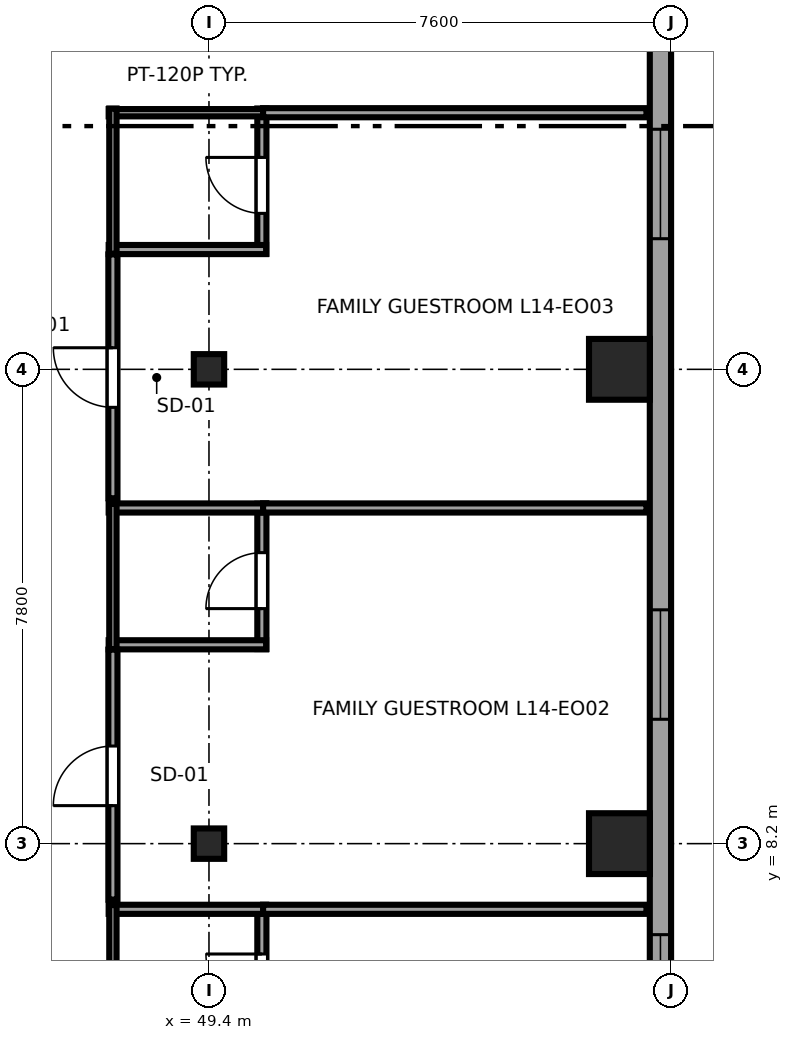
"""IFC4 building model, lengths in metres.
Left out: names, types, materials, properties, quantities, classifications, styles, units other than length and angle.
Written with IfcOpenShell. Run it as: python <this file> out.ifc"""

import sys

from ifc_helpers import new_model, si_unit, direction, frame, frame_2d, origin, origin_2d, place, context, subcontext, project, spatial, rectangle, i_section, extrude, source, transform, mapped, element, fill, save


model = new_model("IFC4")
c1 = context("Model", 3, precision=1e-05, world=origin(), true_north=direction((0.0, 1.0)))
c2 = subcontext(c1, "Body", "Model", "MODEL_VIEW")
j1 = project(units=[si_unit("LENGTHUNIT", "METRE"), si_unit("PLANEANGLEUNIT", "RADIAN")], contexts=[c1])
p1 = place(None, origin())
s1 = spatial("IfcSite", under=j1, at=p1, CompositionType="ELEMENT")
p2 = place(p1, origin())
s2 = spatial("IfcBuilding", under=s1, at=p2, CompositionType="ELEMENT")
p3 = place(p2, frame((0.0, 0.0, 60.4)))
s3 = spatial("IfcBuildingStorey", under=s2, at=p3, CompositionType="ELEMENT", Elevation=60.4)
m1 = source(origin(), c2, "Body", "SweptSolid", [
    extrude(i_section(OverallWidth=0.5, OverallDepth=0.5, WebThickness=0.028, FlangeThickness=0.045, at=origin_2d()), origin(), (0.0, 0.0, 1.0), 3.55),
])
for number, where, z_axis, x_axis in (
    (1, (49.4, 8.2, 0.0), (0.0, 0.0, 1.0), (1.0, 0.0, 0.0)),
    (2, (49.4, 16.0, 0.0), (0.0, 0.0, 1.0), (1.0, 0.0, 0.0)),
):
    element("IfcColumn", number, at=place(p3, frame(where, z_axis=z_axis, x_axis=x_axis)), inside=s3, PredefinedType="COLUMN", context=c2, shape_type="MappedRepresentation", body=[
        mapped(m1, transform((0.0, 0.0, 0.0), x_axis=(1.0, 0.0, 0.0), y_axis=(0.0, 1.0, 0.0), z_axis=(0.0, 0.0, 1.0), scale=1.0)),
    ])
m2 = source(origin(), c2, "Body", "SweptSolid", [
    extrude(rectangle(XDim=1.0, YDim=1.0, at=origin_2d()), origin(), (0.0, 0.0, 1.0), 3.55),
])
for number, where, z_axis, x_axis in (
    (3, (56.15, 8.2, 0.0), (0.0, 0.0, 1.0), (1.0, 0.0, 0.0)),
    (4, (56.15, 16.0, 0.0), (0.0, 0.0, 1.0), (1.0, 0.0, 0.0)),
):
    element("IfcColumn", number, at=place(p3, frame(where, z_axis=z_axis, x_axis=x_axis)), inside=s3, PredefinedType="COLUMN", context=c2, shape_type="MappedRepresentation", body=[
        mapped(m2, transform((0.0, 0.0, 0.0), x_axis=(1.0, 0.0, 0.0), y_axis=(0.0, 1.0, 0.0), z_axis=(0.0, 0.0, 1.0), scale=1.0)),
    ])
p4 = place(p3, frame((56.825, 4.617, 0.0), z_axis=(0.0, 0.0, 1.0), x_axis=(0.0, 1.0, 0.0)))
e5 = element("IfcWall", 5, at=p4, inside=s3, PredefinedType="SOLIDWALL", context=c2, shape_type="SweptSolid", body=[
    extrude(rectangle(XDim=36.766, YDim=0.35, at=frame_2d((18.383, 0.0))), origin(), (0.0, 0.0, 1.0), 3.37),
])
p5 = place(p4, frame((5.628, 0.0, 0.68)))
e6 = element("IfcOpeningElement", 6, at=p5, cuts=e5, PredefinedType="OPENING", context=c2, shape_type="SweptSolid", body=[
    extrude(rectangle(XDim=1.8, YDim=1.85, at=frame_2d((0.9, 0.925))), frame((0.0, 0.185, 0.0), z_axis=(0.0, -1.0, 0.0), x_axis=(1.0, 0.0, 0.0)), (0.0, 0.0, 1.0), 0.37),
])
p6 = place(p4, frame((13.531, 0.0, 0.68)))
e7 = element("IfcOpeningElement", 7, at=p6, cuts=e5, PredefinedType="OPENING", context=c2, shape_type="SweptSolid", body=[
    extrude(rectangle(XDim=1.8, YDim=1.85, at=frame_2d((0.9, 0.925))), frame((0.0, 0.185, 0.0), z_axis=(0.0, -1.0, 0.0), x_axis=(1.0, 0.0, 0.0)), (0.0, 0.0, 1.0), 0.37),
])
p7 = place(p4, frame((16.933, 0.0, 0.68)))
e8 = element("IfcOpeningElement", 8, at=p7, cuts=e5, PredefinedType="OPENING", context=c2, shape_type="SweptSolid", body=[
    extrude(rectangle(XDim=1.8, YDim=1.85, at=frame_2d((0.9, 0.925))), frame((0.0, 0.185, 0.0), z_axis=(0.0, -1.0, 0.0), x_axis=(1.0, 0.0, 0.0)), (0.0, 0.0, 1.0), 0.37),
])
p8 = place(p4, frame((25.386, 0.0, 0.68)))
e9 = element("IfcOpeningElement", 9, at=p8, cuts=e5, PredefinedType="OPENING", context=c2, shape_type="SweptSolid", body=[
    extrude(rectangle(XDim=1.8, YDim=1.85, at=frame_2d((0.9, 0.925))), frame((0.0, 0.185, 0.0), z_axis=(0.0, -1.0, 0.0), x_axis=(1.0, 0.0, 0.0)), (0.0, 0.0, 1.0), 0.37),
])
p9 = place(p4, frame((30.388, 0.0, 0.68)))
e10 = element("IfcOpeningElement", 10, at=p9, cuts=e5, PredefinedType="OPENING", context=c2, shape_type="SweptSolid", body=[
    extrude(rectangle(XDim=1.8, YDim=1.85, at=frame_2d((0.9, 0.925))), frame((0.0, 0.185, 0.0), z_axis=(0.0, -1.0, 0.0), x_axis=(1.0, 0.0, 0.0)), (0.0, 0.0, 1.0), 0.37),
])
p10 = place(p4, frame((33.29, 0.0, 0.68)))
e11 = element("IfcOpeningElement", 11, at=p10, cuts=e5, PredefinedType="OPENING", context=c2, shape_type="SweptSolid", body=[
    extrude(rectangle(XDim=1.8, YDim=1.85, at=frame_2d((0.9, 0.925))), frame((0.0, 0.185, 0.0), z_axis=(0.0, -1.0, 0.0), x_axis=(1.0, 0.0, 0.0)), (0.0, 0.0, 1.0), 0.37),
])
p11 = place(p4, frame((0.586, 0.0, 0.62)))
e12 = element("IfcOpeningElement", 12, at=p11, cuts=e5, PredefinedType="OPENING", context=c2, shape_type="SweptSolid", body=[
    extrude(rectangle(XDim=1.5, YDim=1.55, at=frame_2d((0.75, 0.775))), frame((0.0, 0.185, 0.0), z_axis=(0.0, -1.0, 0.0), x_axis=(1.0, 0.0, 0.0)), (0.0, 0.0, 1.0), 0.37),
])
p12 = place(p3, frame((50.27, 4.8, 0.0), z_axis=(0.0, 0.0, 1.0), x_axis=(0.0, 1.0, 0.0)))
e13 = element("IfcWall", 13, at=p12, inside=s3, PredefinedType="PARTITIONING", context=c2, shape_type="SweptSolid", body=[
    extrude(rectangle(XDim=2.39, YDim=0.15, at=frame_2d((1.195, 0.0))), origin(), (0.0, 0.0, 1.0), 3.37),
])
p13 = place(p12, frame((0.665, 0.0, 0.0)))
e14 = element("IfcOpeningElement", 14, at=p13, cuts=e13, PredefinedType="OPENING", context=c2, shape_type="SweptSolid", body=[
    extrude(rectangle(XDim=0.92, YDim=2.01, at=frame_2d((0.46, 1.005))), frame((0.0, 0.085, 0.0), z_axis=(0.0, -1.0, 0.0), x_axis=(1.0, 0.0, 0.0)), (0.0, 0.0, 1.0), 0.17),
])
p14 = place(p3, frame((47.75, 7.12, 0.0), z_axis=(0.0, 0.0, 1.0), x_axis=(1.0, 0.0, 0.0)))
e15 = element("IfcWall", 15, at=p14, inside=s3, PredefinedType="PARTITIONING", context=c2, shape_type="SweptSolid", body=[
    extrude(rectangle(XDim=2.59, YDim=0.15, at=frame_2d((1.295, 0.0))), origin(), (0.0, 0.0, 1.0), 3.37),
])
p15 = place(p3, frame((47.82, 4.8, 0.0), z_axis=(0.0, 0.0, 1.0), x_axis=(0.0, 1.0, 0.0)))
e16 = element("IfcWall", 16, at=p15, inside=s3, PredefinedType="PLUMBINGWALL", context=c2, shape_type="SweptSolid", body=[
    extrude(rectangle(XDim=2.39, YDim=0.12, at=frame_2d((1.195, 0.0))), origin(), (0.0, 0.0, 1.0), 3.37),
])
p16 = place(p3, frame((50.27, 11.4, 0.0), z_axis=(0.0, 0.0, 1.0), x_axis=(0.0, 1.0, 0.0)))
e17 = element("IfcWall", 17, at=p16, inside=s3, PredefinedType="PARTITIONING", context=c2, shape_type="SweptSolid", body=[
    extrude(rectangle(XDim=2.39, YDim=0.15, at=frame_2d((1.195, 0.0))), origin(), (0.0, 0.0, 1.0), 3.37),
])
p17 = place(p16, frame((0.665, 0.0, 0.0)))
e18 = element("IfcOpeningElement", 18, at=p17, cuts=e17, PredefinedType="OPENING", context=c2, shape_type="SweptSolid", body=[
    extrude(rectangle(XDim=0.92, YDim=2.01, at=frame_2d((0.46, 1.005))), frame((0.0, 0.085, 0.0), z_axis=(0.0, -1.0, 0.0), x_axis=(1.0, 0.0, 0.0)), (0.0, 0.0, 1.0), 0.17),
])
for number, where, z_axis, x_axis in (
    (19, (47.75, 11.47, 0.0), (0.0, 0.0, 1.0), (1.0, 0.0, 0.0)),
    (20, (47.75, 13.72, 0.0), (0.0, 0.0, 1.0), (1.0, 0.0, 0.0)),
):
    element("IfcWall", number, at=place(p3, frame(where, z_axis=z_axis, x_axis=x_axis)), inside=s3, PredefinedType="PARTITIONING", context=c2, shape_type="SweptSolid", body=[
        extrude(rectangle(XDim=2.59, YDim=0.15, at=frame_2d((1.295, 0.0))), origin(), (0.0, 0.0, 1.0), 3.37),
    ])
p18 = place(p3, frame((47.82, 11.4, 0.0), z_axis=(0.0, 0.0, 1.0), x_axis=(0.0, 1.0, 0.0)))
e21 = element("IfcWall", 21, at=p18, inside=s3, PredefinedType="PLUMBINGWALL", context=c2, shape_type="SweptSolid", body=[
    extrude(rectangle(XDim=2.39, YDim=0.12, at=frame_2d((1.195, 0.0))), origin(), (0.0, 0.0, 1.0), 3.37),
])
p19 = place(p3, frame((50.27, 17.9, 0.0), z_axis=(0.0, 0.0, 1.0), x_axis=(0.0, 1.0, 0.0)))
e22 = element("IfcWall", 22, at=p19, inside=s3, PredefinedType="PARTITIONING", context=c2, shape_type="SweptSolid", body=[
    extrude(rectangle(XDim=2.39, YDim=0.15, at=frame_2d((1.195, 0.0))), origin(), (0.0, 0.0, 1.0), 3.37),
])
p20 = place(p19, frame((0.665, 0.0, 0.0)))
e23 = element("IfcOpeningElement", 23, at=p20, cuts=e22, PredefinedType="OPENING", context=c2, shape_type="SweptSolid", body=[
    extrude(rectangle(XDim=0.92, YDim=2.01, at=frame_2d((0.46, 1.005))), frame((0.0, 0.085, 0.0), z_axis=(0.0, -1.0, 0.0), x_axis=(1.0, 0.0, 0.0)), (0.0, 0.0, 1.0), 0.17),
])
p21 = place(p3, frame((47.75, 17.97, 0.0), z_axis=(0.0, 0.0, 1.0), x_axis=(1.0, 0.0, 0.0)))
e24 = element("IfcWall", 24, at=p21, inside=s3, PredefinedType="PARTITIONING", context=c2, shape_type="SweptSolid", body=[
    extrude(rectangle(XDim=2.59, YDim=0.15, at=frame_2d((1.295, 0.0))), origin(), (0.0, 0.0, 1.0), 3.37),
])
p22 = place(p3, frame((47.75, 20.22, 0.0), z_axis=(0.0, 0.0, 1.0), x_axis=(1.0, 0.0, 0.0)))
e25 = element("IfcWall", 25, at=p22, inside=s3, PredefinedType="PLUMBINGWALL", context=c2, shape_type="SweptSolid", body=[
    extrude(rectangle(XDim=2.59, YDim=0.12, at=frame_2d((1.295, 0.0))), origin(), (0.0, 0.0, 1.0), 3.37),
])
p23 = place(p3, frame((47.82, 17.9, 0.0), z_axis=(0.0, 0.0, 1.0), x_axis=(0.0, 1.0, 0.0)))
e26 = element("IfcWall", 26, at=p23, inside=s3, PredefinedType="PLUMBINGWALL", context=c2, shape_type="SweptSolid", body=[
    extrude(rectangle(XDim=2.39, YDim=0.12, at=frame_2d((1.195, 0.0))), origin(), (0.0, 0.0, 1.0), 3.37),
])
p24 = place(p3, frame((50.29, 7.12, 0.0), z_axis=(0.0, 0.0, 1.0), x_axis=(1.0, 0.0, 0.0)))
e27 = element("IfcWall", 27, at=p24, inside=s3, PredefinedType="PARTITIONING", context=c2, shape_type="SweptSolid", body=[
    extrude(rectangle(XDim=6.305, YDim=0.15, at=frame_2d((3.152, 0.0))), origin(), (0.0, 0.0, 1.0), 3.37),
])
p25 = place(p3, frame((47.82, 7.28, 0.0), z_axis=(0.0, 0.0, 1.0), x_axis=(0.0, 1.0, 0.0)))
e28 = element("IfcWall", 28, at=p25, inside=s3, PredefinedType="PARTITIONING", context=c2, shape_type="SweptSolid", body=[
    extrude(rectangle(XDim=4.11, YDim=0.15, at=frame_2d((2.055, 0.0))), origin(), (0.0, 0.0, 1.0), 3.37),
])
p26 = place(p25, frame((1.545, 0.0, 0.0)))
e29 = element("IfcOpeningElement", 29, at=p26, cuts=e28, PredefinedType="OPENING", context=c2, shape_type="SweptSolid", body=[
    extrude(rectangle(XDim=0.98, YDim=2.12, at=frame_2d((0.49, 1.06))), frame((0.0, 0.085, 0.0), z_axis=(0.0, -1.0, 0.0), x_axis=(1.0, 0.0, 0.0)), (0.0, 0.0, 1.0), 0.17),
])
p27 = place(p3, frame((50.29, 13.72, 0.0), z_axis=(0.0, 0.0, 1.0), x_axis=(1.0, 0.0, 0.0)))
e30 = element("IfcWall", 30, at=p27, inside=s3, PredefinedType="PARTITIONING", context=c2, shape_type="SweptSolid", body=[
    extrude(rectangle(XDim=6.305, YDim=0.15, at=frame_2d((3.152, 0.0))), origin(), (0.0, 0.0, 1.0), 3.37),
])
p28 = place(p3, frame((47.82, 13.88, 0.0), z_axis=(0.0, 0.0, 1.0), x_axis=(0.0, 1.0, 0.0)))
e31 = element("IfcWall", 31, at=p28, inside=s3, PredefinedType="PARTITIONING", context=c2, shape_type="SweptSolid", body=[
    extrude(rectangle(XDim=4.01, YDim=0.15, at=frame_2d((2.005, 0.0))), origin(), (0.0, 0.0, 1.0), 3.37),
])
p29 = place(p28, frame((1.495, 0.0, 0.0)))
e32 = element("IfcOpeningElement", 32, at=p29, cuts=e31, PredefinedType="OPENING", context=c2, shape_type="SweptSolid", body=[
    extrude(rectangle(XDim=0.98, YDim=2.12, at=frame_2d((0.49, 1.06))), frame((0.0, 0.085, 0.0), z_axis=(0.0, -1.0, 0.0), x_axis=(1.0, 0.0, 0.0)), (0.0, 0.0, 1.0), 0.17),
])
p30 = place(p3, frame((50.29, 20.22, 0.0), z_axis=(0.0, 0.0, 1.0), x_axis=(1.0, 0.0, 0.0)))
e33 = element("IfcWall", 33, at=p30, inside=s3, PredefinedType="PARTITIONING", context=c2, shape_type="SweptSolid", body=[
    extrude(rectangle(XDim=6.305, YDim=0.15, at=frame_2d((3.152, 0.0))), origin(), (0.0, 0.0, 1.0), 3.37),
])
m3 = source(origin(), c2, "Body", "SweptSolid", [
    extrude(rectangle(XDim=1.8, YDim=1.85, at=frame_2d((0.9, 0.925))), frame((0.0, 0.09, 0.0), z_axis=(0.0, -1.0, 0.0), x_axis=(1.0, 0.0, 0.0)), (0.0, 0.0, 1.0), 0.06),
])
p31 = place(p5, origin())
e34 = element("IfcWindow", 34, at=p31, inside=s3, PartitioningType="TRIPLE_PANEL_HORIZONTAL", PredefinedType="WINDOW", context=c2, shape_type="MappedRepresentation", body=[
    mapped(m3, transform((0.0, 0.0, 0.0), x_axis=(1.0, 0.0, 0.0), y_axis=(0.0, 1.0, 0.0), z_axis=(0.0, 0.0, 1.0), scale=1.0)),
])
fill(e6, e34)
p32 = place(p6, origin())
e35 = element("IfcWindow", 35, at=p32, inside=s3, PartitioningType="TRIPLE_PANEL_HORIZONTAL", PredefinedType="WINDOW", context=c2, shape_type="MappedRepresentation", body=[
    mapped(m3, transform((0.0, 0.0, 0.0), x_axis=(1.0, 0.0, 0.0), y_axis=(0.0, 1.0, 0.0), z_axis=(0.0, 0.0, 1.0), scale=1.0)),
])
fill(e7, e35)
m4 = source(origin(), c2, "Body", "SweptSolid", [
    extrude(rectangle(XDim=1.5, YDim=1.55, at=frame_2d((0.75, 0.775))), frame((0.0, 0.09, 0.0), z_axis=(0.0, -1.0, 0.0), x_axis=(1.0, 0.0, 0.0)), (0.0, 0.0, 1.0), 0.06),
])
p33 = place(p11, origin())
e36 = element("IfcWindow", 36, at=p33, inside=s3, PartitioningType="SINGLE_PANEL", PredefinedType="WINDOW", context=c2, shape_type="MappedRepresentation", body=[
    mapped(m4, transform((0.0, 0.0, 0.0), x_axis=(1.0, 0.0, 0.0), y_axis=(0.0, 1.0, 0.0), z_axis=(0.0, 0.0, 1.0), scale=1.0)),
])
fill(e12, e36)
m5 = source(origin(), c2, "Body", "SweptSolid", [
    extrude(rectangle(XDim=0.92, YDim=2.01, at=frame_2d((0.46, 1.005))), frame((0.0, 0.025, 0.0), z_axis=(0.0, -1.0, 0.0), x_axis=(1.0, 0.0, 0.0)), (0.0, 0.0, 1.0), 0.05),
])
p34 = place(p13, origin())
e37 = element("IfcDoor", 37, at=p34, inside=s3, OperationType="SINGLE_SWING_RIGHT", PredefinedType="DOOR", context=c2, shape_type="MappedRepresentation", body=[
    mapped(m5, transform((0.0, 0.0, 0.0), x_axis=(1.0, 0.0, 0.0), y_axis=(0.0, 1.0, 0.0), z_axis=(0.0, 0.0, 1.0), scale=1.0)),
])
fill(e14, e37)
p35 = place(p17, origin())
e38 = element("IfcDoor", 38, at=p35, inside=s3, OperationType="SINGLE_SWING_LEFT", PredefinedType="DOOR", context=c2, shape_type="MappedRepresentation", body=[
    mapped(m5, transform((0.0, 0.0, 0.0), x_axis=(1.0, 0.0, 0.0), y_axis=(0.0, 1.0, 0.0), z_axis=(0.0, 0.0, 1.0), scale=1.0)),
])
fill(e18, e38)
p36 = place(p20, origin())
e39 = element("IfcDoor", 39, at=p36, inside=s3, OperationType="SINGLE_SWING_RIGHT", PredefinedType="DOOR", context=c2, shape_type="MappedRepresentation", body=[
    mapped(m5, transform((0.0, 0.0, 0.0), x_axis=(1.0, 0.0, 0.0), y_axis=(0.0, 1.0, 0.0), z_axis=(0.0, 0.0, 1.0), scale=1.0)),
])
fill(e23, e39)
m6 = source(origin(), c2, "Body", "SweptSolid", [
    extrude(rectangle(XDim=0.98, YDim=2.12, at=frame_2d((0.49, 1.06))), frame((0.0, 0.025, 0.0), z_axis=(0.0, -1.0, 0.0), x_axis=(1.0, 0.0, 0.0)), (0.0, 0.0, 1.0), 0.05),
])
p37 = place(p26, origin())
e40 = element("IfcDoor", 40, at=p37, inside=s3, OperationType="SINGLE_SWING_LEFT", PredefinedType="DOOR", context=c2, shape_type="MappedRepresentation", body=[
    mapped(m6, transform((0.0, 0.0, 0.0), x_axis=(1.0, 0.0, 0.0), y_axis=(0.0, 1.0, 0.0), z_axis=(0.0, 0.0, 1.0), scale=1.0)),
])
fill(e29, e40)
p38 = place(p29, origin())
e41 = element("IfcDoor", 41, at=p38, inside=s3, OperationType="SINGLE_SWING_RIGHT", PredefinedType="DOOR", context=c2, shape_type="MappedRepresentation", body=[
    mapped(m6, transform((0.0, 0.0, 0.0), x_axis=(1.0, 0.0, 0.0), y_axis=(0.0, 1.0, 0.0), z_axis=(0.0, 0.0, 1.0), scale=1.0)),
])
fill(e32, e41)
save(model, sys.argv[1])
